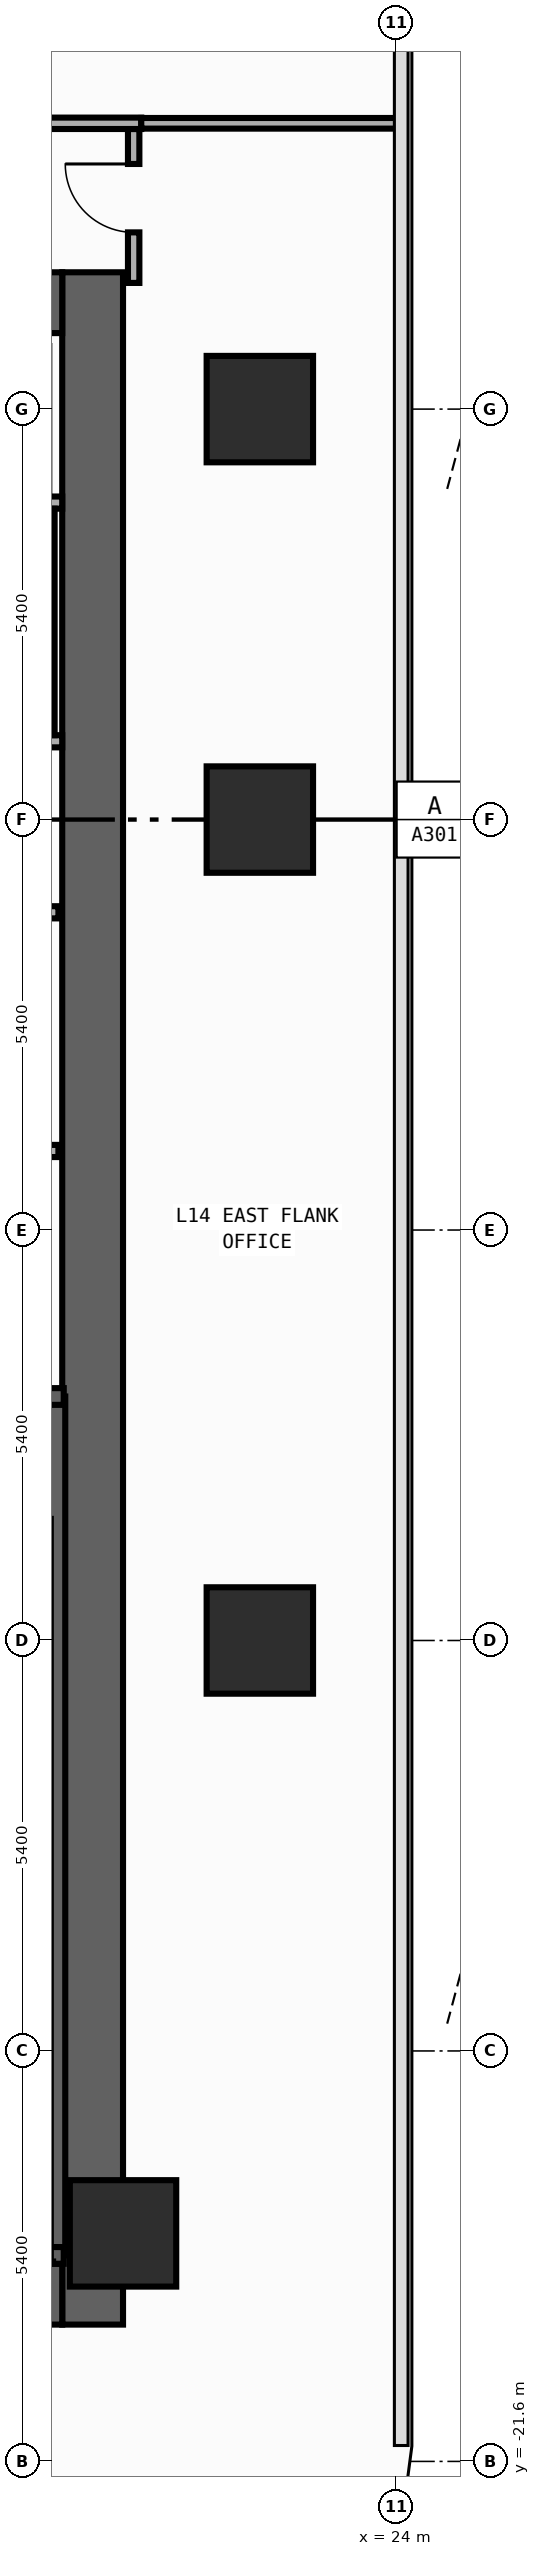
"""IFC4 building model, lengths in metres.
Left out: names, types, materials, properties, quantities, classifications, styles, units other than length and angle.
Written with IfcOpenShell. Run it as: python <this file> out.ifc"""

import sys

from ifc_helpers import new_model, si_unit, direction, frame, frame_2d, origin, origin_2d, place, context, subcontext, project, spatial, rectangle, extrude, element, fill, save


model = new_model("IFC4")
c1 = context("Model", 3, precision=1e-05, world=origin(), true_north=direction((0.0, 1.0)))
c2 = subcontext(c1, "Body", "Model", "MODEL_VIEW")
j1 = project(units=[si_unit("LENGTHUNIT", "METRE"), si_unit("PLANEANGLEUNIT", "RADIAN")], contexts=[c1])
p1 = place(None, origin())
s1 = spatial("IfcSite", under=j1, at=p1, CompositionType="ELEMENT")
p2 = place(p1, origin())
s2 = spatial("IfcBuilding", under=s1, at=p2, CompositionType="ELEMENT")
p3 = place(p2, frame((0.0, 0.0, 59.6)))
s3 = spatial("IfcBuildingStorey", under=s2, at=p3, CompositionType="ELEMENT", Elevation=59.6)
p4 = place(p3, frame((20.0, -19.8, 0.0), z_axis=(0.0, 0.0, 1.0), x_axis=(0.0, 1.0, 0.0)))
e1 = element("IfcWall", 1, at=p4, inside=s3, PredefinedType="SHEAR", context=c2, shape_type="SweptSolid", body=[
    extrude(rectangle(XDim=27.0, YDim=0.8, at=frame_2d((13.5, 0.0))), origin(), (0.0, 0.0, 1.0), 3.94),
])
for number, where, z_axis, x_axis in (
    (2, (12.8, -19.4, 0.0), (0.0, 0.0, 1.0), (1.0, 0.0, 0.0)),
    (3, (12.8, 6.8, 0.0), (0.0, 0.0, 1.0), (1.0, 0.0, 0.0)),
):
    element("IfcWall", number, at=place(p3, frame(where, z_axis=z_axis, x_axis=x_axis)), inside=s3, PredefinedType="SHEAR", context=c2, shape_type="SweptSolid", body=[
        extrude(rectangle(XDim=6.8, YDim=0.8, at=frame_2d((3.4, 0.0))), origin(), (0.0, 0.0, 1.0), 3.94),
    ])
p5 = place(p3, frame((19.53, -18.89, 0.0), z_axis=(0.0, 0.0, 1.0), x_axis=(0.0, 1.0, 0.0)))
e4 = element("IfcWall", 4, at=p5, inside=s3, PredefinedType="SHEAR", context=c2, shape_type="SweptSolid", body=[
    extrude(rectangle(XDim=11.3, YDim=0.22, at=frame_2d((5.65, 0.0))), origin(), (0.0, 0.0, 1.0), 3.94),
])
p6 = place(p3, frame((15.705, -18.89, 0.0), z_axis=(0.0, 0.0, 1.0), x_axis=(1.0, 0.0, 0.0)))
e5 = element("IfcWall", 5, at=p6, inside=s3, PredefinedType="SHEAR", context=c2, shape_type="SweptSolid", body=[
    extrude(rectangle(XDim=3.915, YDim=0.22, at=frame_2d((1.958, 0.0))), origin(), (0.0, 0.0, 1.0), 3.94),
])
p7 = place(p3, frame((19.62, -7.59, 0.0), z_axis=(0.0, 0.0, 1.0), x_axis=(-1.0, 0.0, 0.0)))
e6 = element("IfcWall", 6, at=p7, inside=s3, PredefinedType="SHEAR", context=c2, shape_type="SweptSolid", body=[
    extrude(rectangle(XDim=3.915, YDim=0.22, at=frame_2d((1.958, 0.0))), origin(), (0.0, 0.0, 1.0), 3.94),
])
p8 = place(p7, frame((1.08, 0.0, 0.0)))
e7 = element("IfcOpeningElement", 7, at=p8, cuts=e6, PredefinedType="OPENING", context=c2, shape_type="SweptSolid", body=[
    extrude(rectangle(XDim=1.1, YDim=2.2, at=frame_2d((0.55, 1.1))), frame((0.0, 0.12, 0.0), z_axis=(0.0, -1.0, 0.0), x_axis=(1.0, 0.0, 0.0)), (0.0, 0.0, 1.0), 0.24),
])
for number, where, z_axis, x_axis in (
    (8, (20.4, -18.6, 0.0), (0.0, 0.0, 1.0), (1.0, 0.0, 0.0)),
    (9, (22.2, -10.8, 0.0), (0.0, 0.0, 1.0), (1.0, 0.0, 0.0)),
    (10, (22.2, 0.0, 0.0), (0.0, 0.0, 1.0), (1.0, 0.0, 0.0)),
    (11, (22.2, 5.4, 0.0), (0.0, 0.0, 1.0), (1.0, 0.0, 0.0)),
):
    element("IfcColumn", number, at=place(p3, frame(where, z_axis=z_axis, x_axis=x_axis)), inside=s3, PredefinedType="COLUMN", context=c2, shape_type="SweptSolid", body=[
        extrude(rectangle(XDim=1.4, YDim=1.4, at=origin_2d()), origin(), (0.0, 0.0, 1.0), 4.2),
    ])
p9 = place(p3, frame((15.75, -4.36, 0.0), z_axis=(0.0, 0.0, 1.0), x_axis=(1.0, 0.0, 0.0)))
e12 = element("IfcWall", 12, at=p9, inside=s3, PredefinedType="STANDARD", context=c2, shape_type="SweptSolid", body=[
    extrude(rectangle(XDim=3.8, YDim=0.16, at=frame_2d((1.9, 0.0))), origin(), (0.0, 0.0, 1.0), 3.94),
])
p10 = place(p9, frame((1.47, 0.0, 0.0)))
e13 = element("IfcOpeningElement", 13, at=p10, cuts=e12, PredefinedType="OPENING", context=c2, shape_type="SweptSolid", body=[
    extrude(rectangle(XDim=1.15, YDim=2.2, at=frame_2d((0.575, 1.1))), frame((0.0, 0.09, 0.0), z_axis=(0.0, -1.0, 0.0), x_axis=(1.0, 0.0, 0.0)), (0.0, 0.0, 1.0), 0.18),
])
p11 = place(p3, frame((15.75, -1.22, 0.0), z_axis=(0.0, 0.0, 1.0), x_axis=(1.0, 0.0, 0.0)))
e14 = element("IfcWall", 14, at=p11, inside=s3, PredefinedType="STANDARD", context=c2, shape_type="SweptSolid", body=[
    extrude(rectangle(XDim=3.8, YDim=0.16, at=frame_2d((1.9, 0.0))), origin(), (0.0, 0.0, 1.0), 3.94),
])
for number, where, z_axis, x_axis in (
    (15, (17.31, 4.17, 0.0), (0.0, 0.0, 1.0), (1.0, 0.0, 0.0)),
    (16, (17.31, 1.03, 0.0), (0.0, 0.0, 1.0), (1.0, 0.0, 0.0)),
):
    element("IfcWall", number, at=place(p3, frame(where, z_axis=z_axis, x_axis=x_axis)), inside=s3, PredefinedType="PARTITIONING", context=c2, shape_type="SweptSolid", body=[
        extrude(rectangle(XDim=2.29, YDim=0.16, at=frame_2d((1.145, 0.0))), origin(), (0.0, 0.0, 1.0), 3.94),
    ])
p12 = place(p3, frame((20.54, 7.06, 0.0), z_axis=(0.0, 0.0, 1.0), x_axis=(0.0, 1.0, 0.0)))
e17 = element("IfcWall", 17, at=p12, inside=s3, PredefinedType="PARTITIONING", context=c2, shape_type="SweptSolid", body=[
    extrude(rectangle(XDim=2.025, YDim=0.15, at=frame_2d((1.012, 0.0))), origin(), (0.0, 0.0, 1.0), 3.94),
])
p13 = place(p12, frame((0.665, 0.0, 0.0)))
e18 = element("IfcOpeningElement", 18, at=p13, cuts=e17, PredefinedType="OPENING", context=c2, shape_type="SweptSolid", body=[
    extrude(rectangle(XDim=0.9, YDim=2.15, at=frame_2d((0.45, 1.075))), frame((0.0, 0.085, 0.0), z_axis=(0.0, -1.0, 0.0), x_axis=(1.0, 0.0, 0.0)), (0.0, 0.0, 1.0), 0.17),
])
p14 = place(p3, frame((11.81, 9.16, 0.0), z_axis=(0.0, 0.0, 1.0), x_axis=(1.0, 0.0, 0.0)))
e19 = element("IfcWall", 19, at=p14, inside=s3, PredefinedType="PARTITIONING", context=c2, shape_type="SweptSolid", body=[
    extrude(rectangle(XDim=8.83, YDim=0.15, at=frame_2d((4.415, 0.0))), origin(), (0.0, 0.0, 1.0), 3.94),
])
p15 = place(p14, frame((5.067, 0.0, 0.0)))
e20 = element("IfcOpeningElement", 20, at=p15, cuts=e19, PredefinedType="OPENING", context=c2, shape_type="SweptSolid", body=[
    extrude(rectangle(XDim=0.9, YDim=2.15, at=frame_2d((0.45, 1.075))), frame((0.0, 0.085, 0.0), z_axis=(0.0, -1.0, 0.0), x_axis=(1.0, 0.0, 0.0)), (0.0, 0.0, 1.0), 0.17),
])
p16 = place(p3, frame((20.64, 9.16, 0.0), z_axis=(0.0, 0.0, 1.0), x_axis=(1.0, 0.0, 0.0)))
e21 = element("IfcWall", 21, at=p16, inside=s3, PredefinedType="PARTITIONING", context=c2, shape_type="SweptSolid", body=[
    extrude(rectangle(XDim=3.415, YDim=0.14, at=frame_2d((1.708, 0.0))), origin(), (0.0, 0.0, 1.0), 3.94),
])
p17 = place(p3, frame((19.45, 4.09, 0.0), z_axis=(0.0, 0.0, 1.0), x_axis=(0.0, -1.0, 0.0)))
e22 = element("IfcWall", 22, at=p17, inside=s3, PredefinedType="PARTITIONING", context=c2, shape_type="SweptSolid", body=[
    extrude(rectangle(XDim=2.98, YDim=0.1, at=frame_2d((1.49, 0.0))), origin(), (0.0, 0.0, 1.0), 3.94),
])
p18 = place(p13, origin())
e23 = element("IfcDoor", 23, at=p18, inside=s3, OperationType="SINGLE_SWING_RIGHT", PredefinedType="DOOR", context=c2, shape_type="SweptSolid", body=[
    extrude(rectangle(XDim=0.9, YDim=2.15, at=frame_2d((0.45, 1.075))), frame((0.0, 0.025, 0.0), z_axis=(0.0, -1.0, 0.0), x_axis=(1.0, 0.0, 0.0)), (0.0, 0.0, 1.0), 0.05),
])
fill(e18, e23)
save(model, sys.argv[1])
